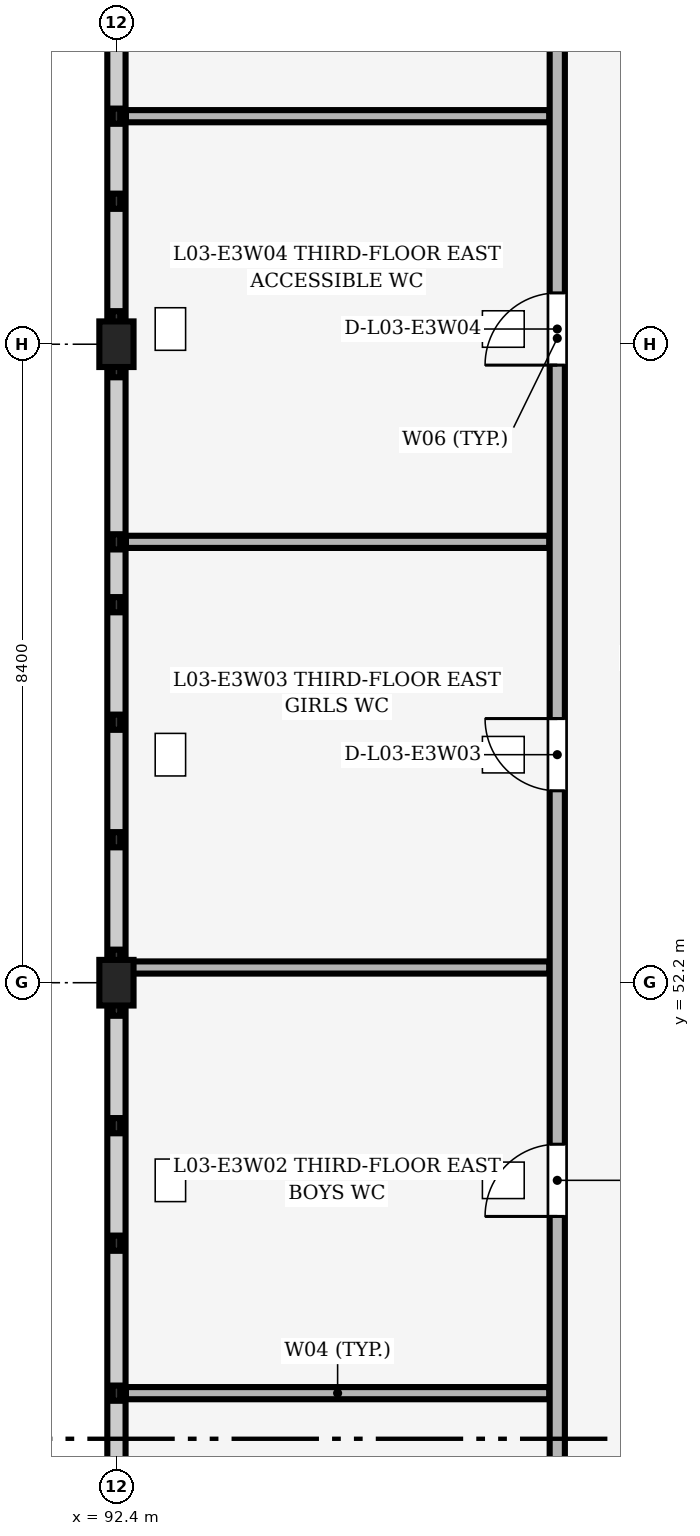
"""IFC4 building model, lengths in metres.
Left out: names, types, materials, properties, quantities, classifications, styles, units other than length and angle.
Written with IfcOpenShell. Run it as: python <this file> out.ifc"""

import sys

from ifc_helpers import new_model, si_unit, direction, frame, frame_2d, origin, origin_2d, place, context, subcontext, project, spatial, rectangle, extrude, element, fill, save


model = new_model("IFC4")
c1 = context("Model", 3, precision=1e-05, world=origin(), true_north=direction((0.0, 1.0)))
c2 = subcontext(c1, "Body", "Model", "MODEL_VIEW")
j1 = project(units=[si_unit("LENGTHUNIT", "METRE"), si_unit("PLANEANGLEUNIT", "RADIAN")], contexts=[c1])
p1 = place(None, origin())
s1 = spatial("IfcSite", under=j1, at=p1, CompositionType="ELEMENT")
p2 = place(p1, origin())
s2 = spatial("IfcBuilding", under=s1, at=p2, CompositionType="ELEMENT")
p3 = place(p2, frame((0.0, 0.0, 13.2)))
s3 = spatial("IfcBuildingStorey", under=s2, at=p3, CompositionType="ELEMENT", Elevation=13.2)
for number, where, z_axis, x_axis in (
    (1, (92.4, 52.2, 0.0), (0.0, 0.0, 1.0), (1.0, 0.0, 0.0)),
    (2, (92.4, 60.6, 0.0), (0.0, 0.0, 1.0), (1.0, 0.0, 0.0)),
):
    element("IfcColumn", number, at=place(p3, frame(where, z_axis=z_axis, x_axis=x_axis)), inside=s3, PredefinedType="COLUMN", context=c2, shape_type="SweptSolid", body=[
        extrude(rectangle(XDim=0.45, YDim=0.6, at=origin_2d()), origin(), (0.0, 0.0, 1.0), 4.2),
    ])
p4 = place(p3, frame((92.4, 44.075, 0.0), z_axis=(0.0, 0.0, 1.0), x_axis=(0.0, 1.0, 0.0)))
e3 = element("IfcWall", 3, at=p4, inside=s3, PredefinedType="SOLIDWALL", context=c2, shape_type="SweptSolid", body=[
    extrude(rectangle(XDim=7.85, YDim=0.24, at=frame_2d((3.925, 0.0))), origin(), (0.0, 0.0, 1.0), 1.15),
])
p5 = place(p3, frame((92.4, 52.475, 0.0), z_axis=(0.0, 0.0, 1.0), x_axis=(0.0, 1.0, 0.0)))
e4 = element("IfcWall", 4, at=p5, inside=s3, PredefinedType="SOLIDWALL", context=c2, shape_type="SweptSolid", body=[
    extrude(rectangle(XDim=7.85, YDim=0.24, at=frame_2d((3.925, 0.0))), origin(), (0.0, 0.0, 1.0), 1.15),
])
p6 = place(p3, frame((92.4, 60.875, 0.0), z_axis=(0.0, 0.0, 1.0), x_axis=(0.0, 1.0, 0.0)))
e5 = element("IfcWall", 5, at=p6, inside=s3, PredefinedType="SOLIDWALL", context=c2, shape_type="SweptSolid", body=[
    extrude(rectangle(XDim=7.85, YDim=0.24, at=frame_2d((3.925, 0.0))), origin(), (0.0, 0.0, 1.0), 1.15),
])
p7 = place(p3, frame((92.525, 46.8, 0.0), z_axis=(0.0, 0.0, 1.0), x_axis=(1.0, 0.0, 0.0)))
e6 = element("IfcWall", 6, at=p7, inside=s3, PredefinedType="PARTITIONING", context=c2, shape_type="SweptSolid", body=[
    extrude(rectangle(XDim=5.57, YDim=0.16, at=frame_2d((2.785, 0.0))), origin(), (0.0, 0.0, 1.0), 3.46),
])
p8 = place(p3, frame((92.525, 52.4, 0.0), z_axis=(0.0, 0.0, 1.0), x_axis=(1.0, 0.0, 0.0)))
e7 = element("IfcWall", 7, at=p8, inside=s3, PredefinedType="PARTITIONING", context=c2, shape_type="SweptSolid", body=[
    extrude(rectangle(XDim=5.57, YDim=0.16, at=frame_2d((2.785, 0.0))), origin(), (0.0, 0.0, 1.0), 3.14),
])
for number, where, z_axis, x_axis in (
    (8, (92.525, 58.0, 0.0), (0.0, 0.0, 1.0), (1.0, 0.0, 0.0)),
    (9, (92.525, 63.6, 0.0), (0.0, 0.0, 1.0), (1.0, 0.0, 0.0)),
):
    element("IfcWall", number, at=place(p3, frame(where, z_axis=z_axis, x_axis=x_axis)), inside=s3, PredefinedType="PARTITIONING", context=c2, shape_type="SweptSolid", body=[
        extrude(rectangle(XDim=5.57, YDim=0.16, at=frame_2d((2.785, 0.0))), origin(), (0.0, 0.0, 1.0), 3.46),
    ])
p9 = place(p3, frame((98.2, 35.565, 0.0), z_axis=(0.0, 0.0, 1.0), x_axis=(0.0, 1.0, 0.0)))
e10 = element("IfcWall", 10, at=p9, inside=s3, PredefinedType="PARTITIONING", context=c2, shape_type="SweptSolid", body=[
    extrude(rectangle(XDim=50.225, YDim=0.2, at=frame_2d((25.113, 0.0))), origin(), (0.0, 0.0, 1.0), 3.9),
])
p10 = place(p9, frame((5.035, 0.0, 0.0)))
e11 = element("IfcOpeningElement", 11, at=p10, cuts=e10, PredefinedType="OPENING", context=c2, shape_type="SweptSolid", body=[
    extrude(rectangle(XDim=1.0, YDim=2.15, at=frame_2d((0.5, 1.075))), frame((0.0, 0.11, 0.0), z_axis=(0.0, -1.0, 0.0), x_axis=(1.0, 0.0, 0.0)), (0.0, 0.0, 1.0), 0.22),
])
p11 = place(p9, frame((13.56, 0.0, 0.0)))
e12 = element("IfcOpeningElement", 12, at=p11, cuts=e10, PredefinedType="OPENING", context=c2, shape_type="SweptSolid", body=[
    extrude(rectangle(XDim=0.95, YDim=2.2, at=frame_2d((0.475, 1.1))), frame((0.0, 0.11, 0.0), z_axis=(0.0, -1.0, 0.0), x_axis=(1.0, 0.0, 0.0)), (0.0, 0.0, 1.0), 0.22),
])
p12 = place(p9, frame((19.16, 0.0, 0.0)))
e13 = element("IfcOpeningElement", 13, at=p12, cuts=e10, PredefinedType="OPENING", context=c2, shape_type="SweptSolid", body=[
    extrude(rectangle(XDim=0.95, YDim=2.2, at=frame_2d((0.475, 1.1))), frame((0.0, 0.11, 0.0), z_axis=(0.0, -1.0, 0.0), x_axis=(1.0, 0.0, 0.0)), (0.0, 0.0, 1.0), 0.22),
])
p13 = place(p9, frame((24.76, 0.0, 0.0)))
e14 = element("IfcOpeningElement", 14, at=p13, cuts=e10, PredefinedType="OPENING", context=c2, shape_type="SweptSolid", body=[
    extrude(rectangle(XDim=0.95, YDim=2.1, at=frame_2d((0.475, 1.05))), frame((0.0, 0.11, 0.0), z_axis=(0.0, -1.0, 0.0), x_axis=(1.0, 0.0, 0.0)), (0.0, 0.0, 1.0), 0.22),
])
p14 = place(p9, frame((33.035, 0.0, 0.0)))
e15 = element("IfcOpeningElement", 15, at=p14, cuts=e10, PredefinedType="OPENING", context=c2, shape_type="SweptSolid", body=[
    extrude(rectangle(XDim=1.0, YDim=2.15, at=frame_2d((0.5, 1.075))), frame((0.0, 0.11, 0.0), z_axis=(0.0, -1.0, 0.0), x_axis=(1.0, 0.0, 0.0)), (0.0, 0.0, 1.0), 0.22),
])
p15 = place(p9, frame((44.135, 0.0, 0.0)))
e16 = element("IfcOpeningElement", 16, at=p15, cuts=e10, PredefinedType="OPENING", context=c2, shape_type="SweptSolid", body=[
    extrude(rectangle(XDim=1.0, YDim=2.15, at=frame_2d((0.5, 1.075))), frame((0.0, 0.11, 0.0), z_axis=(0.0, -1.0, 0.0), x_axis=(1.0, 0.0, 0.0)), (0.0, 0.0, 1.0), 0.22),
])
p16 = place(p11, origin())
e17 = element("IfcDoor", 17, at=p16, inside=s3, OperationType="SINGLE_SWING_LEFT", PredefinedType="DOOR", context=c2, shape_type="SweptSolid", body=[
    extrude(rectangle(XDim=0.95, YDim=2.2, at=frame_2d((0.475, 1.1))), frame((0.0, 0.025, 0.0), z_axis=(0.0, -1.0, 0.0), x_axis=(1.0, 0.0, 0.0)), (0.0, 0.0, 1.0), 0.05),
])
fill(e12, e17)
p17 = place(p12, origin())
e18 = element("IfcDoor", 18, at=p17, inside=s3, OperationType="SINGLE_SWING_RIGHT", PredefinedType="DOOR", context=c2, shape_type="SweptSolid", body=[
    extrude(rectangle(XDim=0.95, YDim=2.2, at=frame_2d((0.475, 1.1))), frame((0.0, 0.025, 0.0), z_axis=(0.0, -1.0, 0.0), x_axis=(1.0, 0.0, 0.0)), (0.0, 0.0, 1.0), 0.05),
])
fill(e13, e18)
p18 = place(p13, origin())
e19 = element("IfcDoor", 19, at=p18, inside=s3, OperationType="SINGLE_SWING_LEFT", PredefinedType="DOOR", context=c2, shape_type="SweptSolid", body=[
    extrude(rectangle(XDim=0.95, YDim=2.1, at=frame_2d((0.475, 1.05))), frame((0.0, 0.025, 0.0), z_axis=(0.0, -1.0, 0.0), x_axis=(1.0, 0.0, 0.0)), (0.0, 0.0, 1.0), 0.05),
])
fill(e14, e19)
save(model, sys.argv[1])
